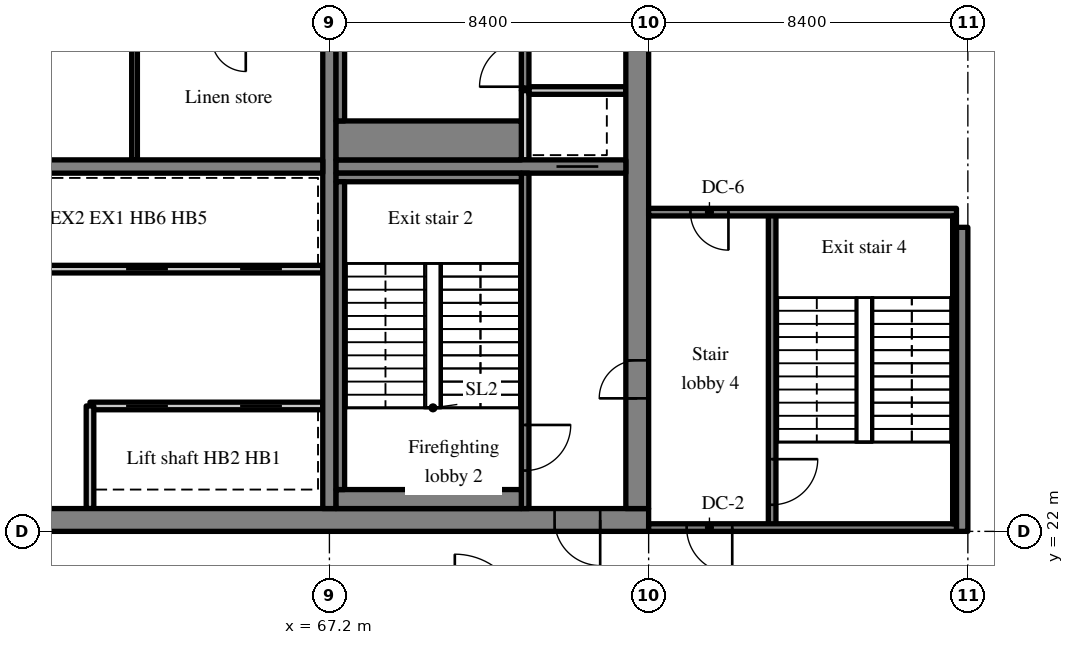
"""IFC4 building model, lengths in metres.
Left out: names, types, materials, properties, quantities, classifications, styles, units other than length and angle.
Written with IfcOpenShell. Run it as: python <this file> out.ifc"""

import sys

from ifc_helpers import new_model, si_unit, direction, frame, frame_2d, origin, place, context, subcontext, project, spatial, rectangle, extrude, source, transform, mapped, element, fill, save


model = new_model("IFC4")
c1 = context("Model", 3, precision=1e-05, world=origin(), true_north=direction((0.0, 1.0)))
c2 = subcontext(c1, "Body", "Model", "MODEL_VIEW")
j1 = project(units=[si_unit("LENGTHUNIT", "METRE"), si_unit("PLANEANGLEUNIT", "RADIAN")], contexts=[c1])
p1 = place(None, origin())
s1 = spatial("IfcSite", under=j1, at=p1, CompositionType="ELEMENT")
p2 = place(p1, origin())
s2 = spatial("IfcBuilding", under=s1, at=p2, CompositionType="ELEMENT")
p3 = place(p2, frame((0.0, 0.0, 237.4)))
s3 = spatial("IfcBuildingStorey", under=s2, at=p3, CompositionType="ELEMENT", Elevation=237.4)
m1 = source(origin(), c2, "Body", "SweptSolid", [
    extrude(rectangle(XDim=50.4, YDim=0.6, at=frame_2d((25.2, 0.0))), origin(), (0.0, 0.0, 1.0), 3.62),
])
p4 = place(p3, frame((25.2, 22.3, 0.0), z_axis=(0.0, 0.0, 1.0), x_axis=(1.0, 0.0, 0.0)))
e1 = element("IfcWall", 1, at=p4, inside=s3, PredefinedType="SHEAR", context=c2, shape_type="MappedRepresentation", body=[
    mapped(m1, transform((0.0, 0.0, 0.0), scale=1.0)),
])
m2 = source(origin(), c2, "Body", "SweptSolid", [
    extrude(rectangle(XDim=1.8, YDim=2.1, at=frame_2d((0.9, 1.05))), frame((0.0, 0.31, 0.0), z_axis=(0.0, -1.0, 0.0), x_axis=(1.0, 0.0, 0.0)), (0.0, 0.0, 1.0), 0.62),
])
p5 = place(p4, frame((15.9, 0.0, 0.0)))
e2 = element("IfcOpeningElement", 2, at=p5, cuts=e1, PredefinedType="OPENING", context=c2, shape_type="MappedRepresentation", body=[
    mapped(m2, transform((0.0, 0.0, 0.0), scale=1.0)),
])
m3 = source(origin(), c2, "Body", "SweptSolid", [
    extrude(rectangle(XDim=0.9, YDim=2.1, at=frame_2d((0.45, 1.05))), frame((0.0, 0.31, 0.0), z_axis=(0.0, -1.0, 0.0), x_axis=(1.0, 0.0, 0.0)), (0.0, 0.0, 1.0), 0.62),
])
p6 = place(p4, frame((9.687, 0.0, 0.0)))
e3 = element("IfcOpeningElement", 3, at=p6, cuts=e1, PredefinedType="OPENING", context=c2, shape_type="MappedRepresentation", body=[
    mapped(m3, transform((0.0, 0.0, 0.0), scale=1.0)),
])
p7 = place(p4, frame((21.513, 0.0, 0.0)))
e4 = element("IfcOpeningElement", 4, at=p7, cuts=e1, PredefinedType="OPENING", context=c2, shape_type="MappedRepresentation", body=[
    mapped(m3, transform((0.0, 0.0, 0.0), scale=1.0)),
])
p8 = place(p4, frame((32.7, 0.0, 0.0)))
e5 = element("IfcOpeningElement", 5, at=p8, cuts=e1, PredefinedType="OPENING", context=c2, shape_type="MappedRepresentation", body=[
    mapped(m2, transform((0.0, 0.0, 0.0), scale=1.0)),
])
m4 = source(origin(), c2, "Body", "SweptSolid", [
    extrude(rectangle(XDim=1.2, YDim=2.1, at=frame_2d((0.6, 1.05))), frame((0.0, 0.31, 0.0), z_axis=(0.0, -1.0, 0.0), x_axis=(1.0, 0.0, 0.0)), (0.0, 0.0, 1.0), 0.62),
])
p9 = place(p4, frame((6.488, 0.0, 0.0)))
e6 = element("IfcOpeningElement", 6, at=p9, cuts=e1, PredefinedType="OPENING", context=c2, shape_type="MappedRepresentation", body=[
    mapped(m4, transform((0.0, 0.0, 0.0), scale=1.0)),
])
p10 = place(p4, frame((47.925, 0.0, 0.0)))
e7 = element("IfcOpeningElement", 7, at=p10, cuts=e1, PredefinedType="OPENING", context=c2, shape_type="MappedRepresentation", body=[
    mapped(m4, transform((0.0, 0.0, 0.0), scale=1.0)),
])
m5 = source(origin(), c2, "Body", "SweptSolid", [
    extrude(rectangle(XDim=18.8, YDim=0.6, at=frame_2d((9.4, 0.0))), origin(), (0.0, 0.0, 1.0), 3.62),
])
p11 = place(p3, frame((75.3, 22.6, 0.0), z_axis=(0.0, 0.0, 1.0), x_axis=(0.0, 1.0, 0.0)))
e8 = element("IfcWall", 8, at=p11, inside=s3, PredefinedType="SHEAR", context=c2, shape_type="MappedRepresentation", body=[
    mapped(m5, transform((0.0, 0.0, 0.0), scale=1.0)),
])
m6 = source(origin(), c2, "Body", "SweptSolid", [
    extrude(rectangle(XDim=1.0, YDim=2.1, at=frame_2d((0.5, 1.05))), frame((0.0, 0.31, 0.0), z_axis=(0.0, -1.0, 0.0), x_axis=(1.0, 0.0, 0.0)), (0.0, 0.0, 1.0), 0.62),
])
p12 = place(p11, frame((2.9, 0.0, 0.0)))
e9 = element("IfcOpeningElement", 9, at=p12, cuts=e8, PredefinedType="OPENING", context=c2, shape_type="MappedRepresentation", body=[
    mapped(m6, transform((0.0, 0.0, 0.0), scale=1.0)),
])
p13 = place(p11, frame((12.8, 0.0, 0.0)))
e10 = element("IfcOpeningElement", 10, at=p13, cuts=e8, PredefinedType="OPENING", context=c2, shape_type="MappedRepresentation", body=[
    mapped(m4, transform((0.0, 0.0, 0.0), scale=1.0)),
])
m7 = source(origin(), c2, "Body", "SweptSolid", [
    extrude(rectangle(XDim=18.8, YDim=0.35, at=frame_2d((9.4, 0.0))), origin(), (0.0, 0.0, 1.0), 3.62),
])
p14 = place(p3, frame((67.2, 22.6, 0.0), z_axis=(0.0, 0.0, 1.0), x_axis=(0.0, 1.0, 0.0)))
e11 = element("IfcWall", 11, at=p14, inside=s3, PredefinedType="SHEAR", context=c2, shape_type="MappedRepresentation", body=[
    mapped(m7, transform((0.0, 0.0, 0.0), scale=1.0)),
])
m8 = source(origin(), c2, "Body", "SweptSolid", [
    extrude(rectangle(XDim=16.45, YDim=0.35, at=frame_2d((8.225, 0.0))), origin(), (0.0, 0.0, 1.0), 3.62),
])
p15 = place(p3, frame((50.575, 31.6, 0.0), z_axis=(0.0, 0.0, 1.0), x_axis=(1.0, 0.0, 0.0)))
e12 = element("IfcWall", 12, at=p15, inside=s3, PredefinedType="SHEAR", context=c2, shape_type="MappedRepresentation", body=[
    mapped(m8, transform((0.0, 0.0, 0.0), scale=1.0)),
])
m9 = source(origin(), c2, "Body", "SweptSolid", [
    extrude(rectangle(XDim=1.0, YDim=2.1, at=frame_2d((0.5, 1.05))), frame((0.0, 0.185, 0.0), z_axis=(0.0, -1.0, 0.0), x_axis=(1.0, 0.0, 0.0)), (0.0, 0.0, 1.0), 0.37),
])
p16 = place(p15, frame((0.613, 0.0, 0.0)))
e13 = element("IfcOpeningElement", 13, at=p16, cuts=e12, PredefinedType="OPENING", context=c2, shape_type="MappedRepresentation", body=[
    mapped(m9, transform((0.0, 0.0, 0.0), scale=1.0)),
])
m10 = source(origin(), c2, "Body", "SweptSolid", [
    extrude(rectangle(XDim=7.625, YDim=0.35, at=frame_2d((3.812, 0.0))), origin(), (0.0, 0.0, 1.0), 3.62),
])
p17 = place(p3, frame((67.375, 31.6, 0.0), z_axis=(0.0, 0.0, 1.0), x_axis=(1.0, 0.0, 0.0)))
e14 = element("IfcWall", 14, at=p17, inside=s3, PredefinedType="SHEAR", context=c2, shape_type="MappedRepresentation", body=[
    mapped(m10, transform((0.0, 0.0, 0.0), scale=1.0)),
])
m11 = source(origin(), c2, "Body", "SweptSolid", [
    extrude(rectangle(XDim=1.1, YDim=2.1, at=frame_2d((0.55, 1.05))), frame((0.0, 0.185, 0.0), z_axis=(0.0, -1.0, 0.0), x_axis=(1.0, 0.0, 0.0)), (0.0, 0.0, 1.0), 0.37),
])
p18 = place(p17, frame((5.8, 0.0, 0.0)))
e15 = element("IfcOpeningElement", 15, at=p18, cuts=e14, PredefinedType="OPENING", context=c2, shape_type="MappedRepresentation", body=[
    mapped(m11, transform((0.0, 0.0, 0.0), scale=1.0)),
])
m12 = source(origin(), c2, "Body", "SweptSolid", [
    extrude(rectangle(XDim=8.0, YDim=0.3, at=frame_2d((4.0, 0.0))), origin(), (0.0, 0.0, 1.0), 3.62),
])
p19 = place(p3, frame((83.85, 22.0, 0.0), z_axis=(0.0, 0.0, 1.0), x_axis=(0.0, 1.0, 0.0)))
e16 = element("IfcWall", 16, at=p19, inside=s3, PredefinedType="SHEAR", context=c2, shape_type="MappedRepresentation", body=[
    mapped(m12, transform((0.0, 0.0, 0.0), scale=1.0)),
])
m13 = source(origin(), c2, "Body", "SweptSolid", [
    extrude(rectangle(XDim=6.125, YDim=0.2, at=frame_2d((3.062, 0.0))), origin(), (0.0, 0.0, 1.0), 3.62),
])
p20 = place(p3, frame((67.025, 25.3, 0.0), z_axis=(0.0, 0.0, 1.0), x_axis=(-1.0, 0.0, 0.0)))
e17 = element("IfcWall", 17, at=p20, inside=s3, PredefinedType="SOLIDWALL", context=c2, shape_type="MappedRepresentation", body=[
    mapped(m13, transform((0.0, 0.0, 0.0), scale=1.0)),
])
m14 = source(origin(), c2, "Body", "SweptSolid", [
    extrude(rectangle(XDim=1.1, YDim=2.1, at=frame_2d((0.55, 1.05))), frame((0.0, 0.11, 0.0), z_axis=(0.0, -1.0, 0.0), x_axis=(1.0, 0.0, 0.0)), (0.0, 0.0, 1.0), 0.22),
])
p21 = place(p20, frame((1.075, 0.0, 0.0)))
e18 = element("IfcOpeningElement", 18, at=p21, cuts=e17, PredefinedType="OPENING", context=c2, shape_type="MappedRepresentation", body=[
    mapped(m14, transform((0.0, 0.0, 0.0), scale=1.0)),
])
p22 = place(p20, frame((4.075, 0.0, 0.0)))
e19 = element("IfcOpeningElement", 19, at=p22, cuts=e17, PredefinedType="OPENING", context=c2, shape_type="MappedRepresentation", body=[
    mapped(m14, transform((0.0, 0.0, 0.0), scale=1.0)),
])
m15 = source(origin(), c2, "Body", "SweptSolid", [
    extrude(rectangle(XDim=12.125, YDim=0.2, at=frame_2d((6.062, 0.0))), origin(), (0.0, 0.0, 1.0), 3.62),
])
p23 = place(p3, frame((67.025, 28.9, 0.0), z_axis=(0.0, 0.0, 1.0), x_axis=(-1.0, 0.0, 0.0)))
e20 = element("IfcWall", 20, at=p23, inside=s3, PredefinedType="SOLIDWALL", context=c2, shape_type="MappedRepresentation", body=[
    mapped(m15, transform((0.0, 0.0, 0.0), scale=1.0)),
])
p24 = place(p23, frame((1.075, 0.0, 0.0)))
e21 = element("IfcOpeningElement", 21, at=p24, cuts=e20, PredefinedType="OPENING", context=c2, shape_type="MappedRepresentation", body=[
    mapped(m14, transform((0.0, 0.0, 0.0), scale=1.0)),
])
p25 = place(p23, frame((4.075, 0.0, 0.0)))
e22 = element("IfcOpeningElement", 22, at=p25, cuts=e20, PredefinedType="OPENING", context=c2, shape_type="MappedRepresentation", body=[
    mapped(m14, transform((0.0, 0.0, 0.0), scale=1.0)),
])
m16 = source(origin(), c2, "Body", "SweptSolid", [
    extrude(rectangle(XDim=2.7, YDim=0.2, at=frame_2d((1.35, 0.0))), origin(), (0.0, 0.0, 1.0), 3.62),
])
p26 = place(p3, frame((60.9, 22.6, 0.0), z_axis=(0.0, 0.0, 1.0), x_axis=(0.0, 1.0, 0.0)))
e23 = element("IfcWall", 23, at=p26, inside=s3, PredefinedType="SOLIDWALL", context=c2, shape_type="MappedRepresentation", body=[
    mapped(m16, transform((0.0, 0.0, 0.0), scale=1.0)),
])
m17 = source(origin(), c2, "Body", "SweptSolid", [
    extrude(rectangle(XDim=3.225, YDim=0.15, at=frame_2d((1.613, 0.0))), origin(), (0.0, 0.0, 1.0), 3.62),
])
p27 = place(p3, frame((62.072, 31.775, 0.0), z_axis=(0.0, 0.0, 1.0), x_axis=(0.0, 1.0, 0.0)))
e24 = element("IfcWall", 24, at=p27, inside=s3, PredefinedType="PARTITIONING", context=c2, shape_type="MappedRepresentation", body=[
    mapped(m17, transform((0.0, 0.0, 0.0), scale=1.0)),
])
m18 = source(origin(), c2, "Body", "SweptSolid", [
    extrude(rectangle(XDim=8.825, YDim=0.2, at=frame_2d((4.413, 0.0))), origin(), (0.0, 0.0, 1.0), 3.62),
])
p28 = place(p3, frame((72.35, 22.6, 0.0), z_axis=(0.0, 0.0, 1.0), x_axis=(0.0, 1.0, 0.0)))
e25 = element("IfcWall", 25, at=p28, inside=s3, PredefinedType="SOLIDWALL", context=c2, shape_type="MappedRepresentation", body=[
    mapped(m18, transform((0.0, 0.0, 0.0), scale=1.0)),
])
m19 = source(origin(), c2, "Body", "SweptSolid", [
    extrude(rectangle(XDim=1.2, YDim=2.1, at=frame_2d((0.6, 1.05))), frame((0.0, 0.11, 0.0), z_axis=(0.0, -1.0, 0.0), x_axis=(1.0, 0.0, 0.0)), (0.0, 0.0, 1.0), 0.22),
])
p29 = place(p28, frame((1.0, 0.0, 0.0)))
e26 = element("IfcOpeningElement", 26, at=p29, cuts=e25, PredefinedType="OPENING", context=c2, shape_type="MappedRepresentation", body=[
    mapped(m19, transform((0.0, 0.0, 0.0), scale=1.0)),
])
m20 = source(origin(), c2, "Body", "SweptSolid", [
    extrude(rectangle(XDim=1.825, YDim=0.2, at=frame_2d((0.913, 0.0))), origin(), (0.0, 0.0, 1.0), 3.62),
])
p30 = place(p3, frame((72.35, 31.775, 0.0), z_axis=(0.0, 0.0, 1.0), x_axis=(0.0, 1.0, 0.0)))
e27 = element("IfcWall", 27, at=p30, inside=s3, PredefinedType="SOLIDWALL", context=c2, shape_type="MappedRepresentation", body=[
    mapped(m20, transform((0.0, 0.0, 0.0), scale=1.0)),
])
m21 = source(origin(), c2, "Body", "SweptSolid", [
    extrude(rectangle(XDim=2.55, YDim=0.2, at=frame_2d((1.275, 0.0))), origin(), (0.0, 0.0, 1.0), 3.62),
])
p31 = place(p3, frame((72.45, 33.6, 0.0), z_axis=(0.0, 0.0, 1.0), x_axis=(1.0, 0.0, 0.0)))
e28 = element("IfcWall", 28, at=p31, inside=s3, PredefinedType="SOLIDWALL", context=c2, shape_type="MappedRepresentation", body=[
    mapped(m21, transform((0.0, 0.0, 0.0), scale=1.0)),
])
m22 = source(origin(), c2, "Body", "SweptSolid", [
    extrude(rectangle(XDim=7.8, YDim=0.2, at=frame_2d((3.9, 0.0))), origin(), (0.0, 0.0, 1.0), 3.62),
])
p32 = place(p3, frame((72.35, 33.6, 0.0), z_axis=(0.0, 0.0, 1.0), x_axis=(0.0, 1.0, 0.0)))
e29 = element("IfcWall", 29, at=p32, inside=s3, PredefinedType="SOLIDWALL", context=c2, shape_type="MappedRepresentation", body=[
    mapped(m22, transform((0.0, 0.0, 0.0), scale=1.0)),
])
p33 = place(p32, frame((0.1, 0.0, 0.0)))
e30 = element("IfcOpeningElement", 30, at=p33, cuts=e29, PredefinedType="OPENING", context=c2, shape_type="MappedRepresentation", body=[
    mapped(m19, transform((0.0, 0.0, 0.0), scale=1.0)),
])
m23 = source(origin(), c2, "Body", "SweptSolid", [
    extrude(rectangle(XDim=8.3, YDim=0.2, at=frame_2d((4.15, 0.0))), origin(), (0.0, 0.0, 1.0), 3.62),
])
p34 = place(p3, frame((78.85, 22.1, 0.0), z_axis=(0.0, 0.0, 1.0), x_axis=(0.0, 1.0, 0.0)))
e31 = element("IfcWall", 31, at=p34, inside=s3, PredefinedType="SOLIDWALL", context=c2, shape_type="MappedRepresentation", body=[
    mapped(m23, transform((0.0, 0.0, 0.0), scale=1.0)),
])
p35 = place(p34, frame((0.6, 0.0, 0.0)))
e32 = element("IfcOpeningElement", 32, at=p35, cuts=e31, PredefinedType="OPENING", context=c2, shape_type="MappedRepresentation", body=[
    mapped(m19, transform((0.0, 0.0, 0.0), scale=1.0)),
])
m24 = source(origin(), c2, "Body", "SweptSolid", [
    extrude(rectangle(XDim=8.1, YDim=0.2, at=frame_2d((4.05, 0.0))), origin(), (0.0, 0.0, 1.0), 3.62),
])
p36 = place(p3, frame((83.7, 22.1, 0.0), z_axis=(0.0, 0.0, 1.0), x_axis=(-1.0, 0.0, 0.0)))
e33 = element("IfcWall", 33, at=p36, inside=s3, PredefinedType="SOLIDWALL", context=c2, shape_type="MappedRepresentation", body=[
    mapped(m24, transform((0.0, 0.0, 0.0), scale=1.0)),
])
p37 = place(p36, frame((5.9, 0.0, 0.0)))
e34 = element("IfcOpeningElement", 34, at=p37, cuts=e33, PredefinedType="OPENING", context=c2, shape_type="MappedRepresentation", body=[
    mapped(m19, transform((0.0, 0.0, 0.0), scale=1.0)),
])
p38 = place(p3, frame((83.7, 30.4, 0.0), z_axis=(0.0, 0.0, 1.0), x_axis=(-1.0, 0.0, 0.0)))
e35 = element("IfcWall", 35, at=p38, inside=s3, PredefinedType="SOLIDWALL", context=c2, shape_type="MappedRepresentation", body=[
    mapped(m24, transform((0.0, 0.0, 0.0), scale=1.0)),
])
m25 = source(origin(), c2, "Body", "SweptSolid", [
    extrude(rectangle(XDim=1.0, YDim=2.1, at=frame_2d((0.5, 1.05))), frame((0.0, 0.11, 0.0), z_axis=(0.0, -1.0, 0.0), x_axis=(1.0, 0.0, 0.0)), (0.0, 0.0, 1.0), 0.22),
])
p39 = place(p38, frame((6.0, 0.0, 0.0)))
e36 = element("IfcOpeningElement", 36, at=p39, cuts=e35, PredefinedType="OPENING", context=c2, shape_type="MappedRepresentation", body=[
    mapped(m25, transform((0.0, 0.0, 0.0), scale=1.0)),
])
m26 = source(origin(), c2, "Body", "SweptSolid", [
    extrude(rectangle(XDim=4.875, YDim=0.5, at=frame_2d((2.438, 0.0))), origin(), (0.0, 0.0, 1.0), 3.62),
])
p40 = place(p3, frame((67.375, 22.85, 0.0), z_axis=(0.0, 0.0, 1.0), x_axis=(1.0, 0.0, 0.0)))
e37 = element("IfcWall", 37, at=p40, inside=s3, PredefinedType="SOLIDWALL", context=c2, shape_type="MappedRepresentation", body=[
    mapped(m26, transform((0.0, 0.0, 0.0), scale=1.0)),
])
m27 = source(origin(), c2, "Body", "SweptSolid", [
    extrude(rectangle(XDim=4.875, YDim=0.225, at=frame_2d((2.438, 0.0))), origin(), (0.0, 0.0, 1.0), 3.62),
])
p41 = place(p3, frame((67.375, 31.312, 0.0), z_axis=(0.0, 0.0, 1.0), x_axis=(1.0, 0.0, 0.0)))
e38 = element("IfcWall", 38, at=p41, inside=s3, PredefinedType="SOLIDWALL", context=c2, shape_type="MappedRepresentation", body=[
    mapped(m27, transform((0.0, 0.0, 0.0), scale=1.0)),
])
m28 = source(origin(), c2, "Body", "SweptSolid", [
    extrude(rectangle(XDim=8.1, YDim=0.225, at=frame_2d((4.05, 0.0))), origin(), (0.0, 0.0, 1.0), 3.62),
])
p42 = place(p3, frame((67.487, 23.1, 0.0), z_axis=(0.0, 0.0, 1.0), x_axis=(0.0, 1.0, 0.0)))
e39 = element("IfcWall", 39, at=p42, inside=s3, PredefinedType="SOLIDWALL", context=c2, shape_type="MappedRepresentation", body=[
    mapped(m28, transform((0.0, 0.0, 0.0), scale=1.0)),
])
m29 = source(origin(), c2, "Body", "SweptSolid", [
    extrude(rectangle(XDim=4.875, YDim=1.025, at=frame_2d((2.438, 0.0))), origin(), (0.0, 0.0, 1.0), 3.62),
])
p43 = place(p3, frame((67.375, 32.287, 0.0), z_axis=(0.0, 0.0, 1.0), x_axis=(1.0, 0.0, 0.0)))
e40 = element("IfcWall", 40, at=p43, inside=s3, PredefinedType="SOLIDWALL", context=c2, shape_type="MappedRepresentation", body=[
    mapped(m29, transform((0.0, 0.0, 0.0), scale=1.0)),
])
p44 = place(p3, frame((67.487, 32.8, 0.0), z_axis=(0.0, 0.0, 1.0), x_axis=(0.0, 1.0, 0.0)))
e41 = element("IfcWall", 41, at=p44, inside=s3, PredefinedType="SOLIDWALL", context=c2, shape_type="MappedRepresentation", body=[
    mapped(m28, transform((0.0, 0.0, 0.0), scale=1.0)),
])
m30 = source(origin(), c2, "Body", "SweptSolid", [
    extrude(rectangle(XDim=8.1, YDim=0.1, at=frame_2d((4.05, 0.0))), origin(), (0.0, 0.0, 1.0), 3.62),
])
p45 = place(p3, frame((83.65, 22.2, 0.0), z_axis=(0.0, 0.0, 1.0), x_axis=(0.0, 1.0, 0.0)))
e42 = element("IfcWall", 42, at=p45, inside=s3, PredefinedType="SOLIDWALL", context=c2, shape_type="MappedRepresentation", body=[
    mapped(m30, transform((0.0, 0.0, 0.0), scale=1.0)),
])
m31 = source(origin(), c2, "Body", "SweptSolid", [
    extrude(rectangle(XDim=1.1, YDim=2.1, at=frame_2d((0.55, 1.05))), frame((0.0, 0.025, 0.0), z_axis=(0.0, -1.0, 0.0), x_axis=(1.0, 0.0, 0.0)), (0.0, 0.0, 1.0), 0.05),
])
p46 = place(p21, origin())
e43 = element("IfcDoor", 43, at=p46, inside=s3, OperationType="SLIDING_TO_RIGHT", PredefinedType="DOOR", context=c2, shape_type="MappedRepresentation", body=[
    mapped(m31, transform((0.0, 0.0, 0.0), scale=1.0)),
])
fill(e18, e43)
p47 = place(p22, origin())
e44 = element("IfcDoor", 44, at=p47, inside=s3, OperationType="SLIDING_TO_LEFT", PredefinedType="DOOR", context=c2, shape_type="MappedRepresentation", body=[
    mapped(m31, transform((0.0, 0.0, 0.0), scale=1.0)),
])
fill(e19, e44)
p48 = place(p24, origin())
e45 = element("IfcDoor", 45, at=p48, inside=s3, OperationType="SLIDING_TO_RIGHT", PredefinedType="DOOR", context=c2, shape_type="MappedRepresentation", body=[
    mapped(m31, transform((0.0, 0.0, 0.0), scale=1.0)),
])
fill(e21, e45)
p49 = place(p25, origin())
e46 = element("IfcDoor", 46, at=p49, inside=s3, OperationType="SLIDING_TO_LEFT", PredefinedType="DOOR", context=c2, shape_type="MappedRepresentation", body=[
    mapped(m31, transform((0.0, 0.0, 0.0), scale=1.0)),
])
fill(e22, e46)
m32 = source(origin(), c2, "Body", "SweptSolid", [
    extrude(rectangle(XDim=1.2, YDim=2.1, at=frame_2d((0.6, 1.05))), frame((0.0, 0.025, 0.0), z_axis=(0.0, -1.0, 0.0), x_axis=(1.0, 0.0, 0.0)), (0.0, 0.0, 1.0), 0.05),
])
p50 = place(p29, origin())
e47 = element("IfcDoor", 47, at=p50, inside=s3, OperationType="SINGLE_SWING_RIGHT", PredefinedType="DOOR", context=c2, shape_type="MappedRepresentation", body=[
    mapped(m32, transform((0.0, 0.0, 0.0), scale=1.0)),
])
fill(e26, e47)
m33 = source(origin(), c2, "Body", "SweptSolid", [
    extrude(rectangle(XDim=1.2, YDim=2.1, at=frame_2d((0.6, 1.05))), frame((0.0, 0.225, 0.0), z_axis=(0.0, -1.0, 0.0), x_axis=(1.0, 0.0, 0.0)), (0.0, 0.0, 1.0), 0.05),
])
p51 = place(p10, origin())
e48 = element("IfcDoor", 48, at=p51, inside=s3, OperationType="SINGLE_SWING_RIGHT", PredefinedType="DOOR", context=c2, shape_type="MappedRepresentation", body=[
    mapped(m33, transform((0.0, 0.0, 0.0), scale=1.0)),
])
fill(e7, e48)
p52 = place(p18, origin())
e49 = element("IfcDoor", 49, at=p52, inside=s3, OperationType="SLIDING_TO_RIGHT", PredefinedType="DOOR", context=c2, shape_type="MappedRepresentation", body=[
    mapped(m31, transform((0.0, 0.0, 0.0), scale=1.0)),
])
fill(e15, e49)
m34 = source(origin(), c2, "Body", "SweptSolid", [
    extrude(rectangle(XDim=1.0, YDim=2.1, at=frame_2d((0.5, 1.05))), frame((0.0, 0.025, 0.0), z_axis=(0.0, -1.0, 0.0), x_axis=(1.0, 0.0, 0.0)), (0.0, 0.0, 1.0), 0.05),
])
p53 = place(p12, origin())
e50 = element("IfcDoor", 50, at=p53, inside=s3, OperationType="SINGLE_SWING_LEFT", PredefinedType="DOOR", context=c2, shape_type="MappedRepresentation", body=[
    mapped(m34, transform((0.0, 0.0, 0.0), scale=1.0)),
])
fill(e9, e50)
p54 = place(p33, origin())
e51 = element("IfcDoor", 51, at=p54, inside=s3, OperationType="SINGLE_SWING_LEFT", PredefinedType="DOOR", context=c2, shape_type="MappedRepresentation", body=[
    mapped(m32, transform((0.0, 0.0, 0.0), scale=1.0)),
])
fill(e30, e51)
p55 = place(p35, origin())
e52 = element("IfcDoor", 52, at=p55, inside=s3, OperationType="SINGLE_SWING_RIGHT", PredefinedType="DOOR", context=c2, shape_type="MappedRepresentation", body=[
    mapped(m32, transform((0.0, 0.0, 0.0), scale=1.0)),
])
fill(e32, e52)
p56 = place(p37, origin())
e53 = element("IfcDoor", 53, at=p56, inside=s3, OperationType="SINGLE_SWING_LEFT", PredefinedType="DOOR", context=c2, shape_type="MappedRepresentation", body=[
    mapped(m32, transform((0.0, 0.0, 0.0), scale=1.0)),
])
fill(e34, e53)
p57 = place(p39, origin())
e54 = element("IfcDoor", 54, at=p57, inside=s3, OperationType="SINGLE_SWING_LEFT", PredefinedType="DOOR", context=c2, shape_type="MappedRepresentation", body=[
    mapped(m34, transform((0.0, 0.0, 0.0), scale=1.0)),
])
fill(e36, e54)
save(model, sys.argv[1])
